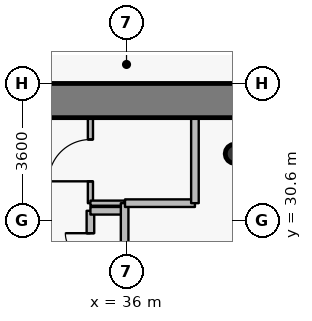
"""IFC4 building model, lengths in metres.
Left out: names, types, materials, properties, quantities, classifications, styles, units other than length and angle.
Written with IfcOpenShell. Run it as: python <this file> out.ifc"""

import sys

from ifc_helpers import new_model, si_unit, direction, frame, frame_2d, origin, origin_2d, place, context, subcontext, project, spatial, rectangle, hollow_circle, extrude, source, transform, mapped, element, fill, save


model = new_model("IFC4")
c1 = context("Model", 3, precision=1e-05, world=origin(), true_north=direction((0.0, 1.0)))
c2 = subcontext(c1, "Body", "Model", "MODEL_VIEW")
j1 = project(units=[si_unit("LENGTHUNIT", "METRE"), si_unit("PLANEANGLEUNIT", "RADIAN")], contexts=[c1])
p1 = place(None, origin())
s1 = spatial("IfcSite", under=j1, at=p1, CompositionType="ELEMENT")
p2 = place(p1, origin())
s2 = spatial("IfcBuilding", under=s1, at=p2, CompositionType="ELEMENT")
p3 = place(p2, frame((0.0, 0.0, 82.8)))
s3 = spatial("IfcBuildingStorey", under=s2, at=p3, CompositionType="ELEMENT", Elevation=82.8)
p4 = place(p3, frame((38.85, 32.35, 0.0), z_axis=(0.0, 0.0, 1.0), x_axis=(1.0, 0.0, 0.0)))
e1 = element("IfcColumn", 1, at=p4, inside=s3, PredefinedType="COLUMN", context=c2, shape_type="SweptSolid", body=[
    extrude(hollow_circle(Radius=0.254, WallThickness=0.02, at=origin_2d()), origin(), (0.0, 0.0, 1.0), 4.2),
])
p5 = place(p3, frame((26.75, 33.75, 0.0), z_axis=(0.0, 0.0, 1.0), x_axis=(1.0, 0.0, 0.0)))
e2 = element("IfcWall", 2, at=p5, inside=s3, PredefinedType="SHEAR", context=c2, shape_type="SweptSolid", body=[
    extrude(rectangle(XDim=18.5, YDim=0.9, at=frame_2d((9.25, 0.0))), origin(), (0.0, 0.0, 1.0), 3.35),
])
p6 = place(p3, frame((35.05, 27.25, 0.0), z_axis=(0.0, 0.0, 1.0), x_axis=(0.0, 1.0, 0.0)))
e3 = element("IfcWall", 3, at=p6, inside=s3, PredefinedType="PARTITIONING", context=c2, shape_type="SweptSolid", body=[
    extrude(rectangle(XDim=3.6, YDim=0.2, at=frame_2d((1.8, 0.0))), origin(), (0.0, 0.0, 1.0), 3.9),
])
p7 = place(p6, frame((0.59, 0.0, 0.0)))
e4 = element("IfcOpeningElement", 4, at=p7, cuts=e3, PredefinedType="OPENING", context=c2, shape_type="SweptSolid", body=[
    extrude(rectangle(XDim=0.66, YDim=2.05, at=origin_2d()), frame((0.33, 0.11, 1.025), z_axis=(0.0, -1.0, 0.0), x_axis=(1.0, 0.0, 0.0)), (0.0, 0.0, 1.0), 0.22),
])
p8 = place(p6, frame((2.35, 0.0, 0.0)))
e5 = element("IfcOpeningElement", 5, at=p8, cuts=e3, PredefinedType="OPENING", context=c2, shape_type="SweptSolid", body=[
    extrude(rectangle(XDim=0.66, YDim=2.05, at=origin_2d()), frame((0.33, 0.11, 1.025), z_axis=(0.0, -1.0, 0.0), x_axis=(1.0, 0.0, 0.0)), (0.0, 0.0, 1.0), 0.22),
])
p9 = place(p3, frame((35.05, 30.85, 0.0), z_axis=(0.0, 0.0, 1.0), x_axis=(1.0, 0.0, 0.0)))
e6 = element("IfcWall", 6, at=p9, inside=s3, PredefinedType="PARTITIONING", context=c2, shape_type="SweptSolid", body=[
    extrude(rectangle(XDim=0.9, YDim=0.2, at=frame_2d((0.45, 0.0))), origin(), (0.0, 0.0, 1.0), 3.9),
])
p10 = place(p3, frame((35.05, 31.05, 0.0), z_axis=(0.0, 0.0, 1.0), x_axis=(0.0, 1.0, 0.0)))
e7 = element("IfcWall", 7, at=p10, inside=s3, PredefinedType="PARTITIONING", context=c2, shape_type="SweptSolid", body=[
    extrude(rectangle(XDim=2.25, YDim=0.135, at=frame_2d((1.125, 0.0))), origin(), (0.0, 0.0, 1.0), 3.485),
])
p11 = place(p10, frame((0.575, 0.0, 0.0)))
e8 = element("IfcOpeningElement", 8, at=p11, cuts=e7, PredefinedType="OPENING", context=c2, shape_type="SweptSolid", body=[
    extrude(rectangle(XDim=1.1, YDim=2.15, at=origin_2d()), frame((0.55, 0.078, 1.075), z_axis=(0.0, -1.0, 0.0), x_axis=(1.0, 0.0, 0.0)), (0.0, 0.0, 1.0), 0.155),
])
p12 = place(p3, frame((35.05, 31.05, 0.0), z_axis=(0.0, 0.0, 1.0), x_axis=(1.0, 0.0, 0.0)))
e9 = element("IfcWall", 9, at=p12, inside=s3, PredefinedType="PARTITIONING", context=c2, shape_type="SweptSolid", body=[
    extrude(rectangle(XDim=0.9, YDim=0.135, at=frame_2d((0.45, 0.0))), origin(), (0.0, 0.0, 1.0), 3.9),
])
p13 = place(p3, frame((35.95, 27.25, 0.0), z_axis=(0.0, 0.0, 1.0), x_axis=(0.0, 1.0, 0.0)))
e10 = element("IfcWall", 10, at=p13, inside=s3, PredefinedType="PARTITIONING", context=c2, shape_type="SweptSolid", body=[
    extrude(rectangle(XDim=3.8, YDim=0.2, at=frame_2d((1.9, 0.0))), origin(), (0.0, 0.0, 1.0), 3.9),
])
p14 = place(p3, frame((35.96, 31.05, 0.0), z_axis=(0.0, 0.0, 1.0), x_axis=(1.0, 0.0, 0.0)))
e11 = element("IfcWall", 11, at=p14, inside=s3, PredefinedType="PARTITIONING", context=c2, shape_type="SweptSolid", body=[
    extrude(rectangle(XDim=1.84, YDim=0.2, at=frame_2d((0.92, 0.0))), origin(), (0.0, 0.0, 1.0), 3.9),
])
p15 = place(p3, frame((37.8, 31.05, 0.0), z_axis=(0.0, 0.0, 1.0), x_axis=(0.0, 1.0, 0.0)))
e12 = element("IfcWall", 12, at=p15, inside=s3, PredefinedType="PARTITIONING", context=c2, shape_type="SweptSolid", body=[
    extrude(rectangle(XDim=2.25, YDim=0.2, at=frame_2d((1.125, 0.0))), origin(), (0.0, 0.0, 1.0), 3.485),
])
m1 = source(origin(), c2, "Body", "SweptSolid", [
    extrude(rectangle(XDim=0.66, YDim=2.05, at=origin_2d()), frame((0.33, 0.025, 1.025), z_axis=(0.0, -1.0, 0.0), x_axis=(1.0, 0.0, 0.0)), (0.0, 0.0, 1.0), 0.05),
])
p16 = place(p8, origin())
e13 = element("IfcDoor", 13, at=p16, inside=s3, OperationType="SINGLE_SWING_RIGHT", PredefinedType="USERDEFINED", context=c2, shape_type="MappedRepresentation", body=[
    mapped(m1, transform((0.0, 0.0, 0.0), x_axis=(1.0, 0.0, 0.0), y_axis=(0.0, 1.0, 0.0), z_axis=(0.0, 0.0, 1.0), scale=1.0)),
])
fill(e5, e13)
m2 = source(origin(), c2, "Body", "SweptSolid", [
    extrude(rectangle(XDim=1.1, YDim=2.15, at=origin_2d()), frame((0.55, 0.025, 1.075), z_axis=(0.0, -1.0, 0.0), x_axis=(1.0, 0.0, 0.0)), (0.0, 0.0, 1.0), 0.05),
])
p17 = place(p11, origin())
e14 = element("IfcDoor", 14, at=p17, inside=s3, OperationType="SINGLE_SWING_LEFT", PredefinedType="DOOR", context=c2, shape_type="MappedRepresentation", body=[
    mapped(m2, transform((0.0, 0.0, 0.0), x_axis=(1.0, 0.0, 0.0), y_axis=(0.0, 1.0, 0.0), z_axis=(0.0, 0.0, 1.0), scale=1.0)),
])
fill(e8, e14)
save(model, sys.argv[1])
